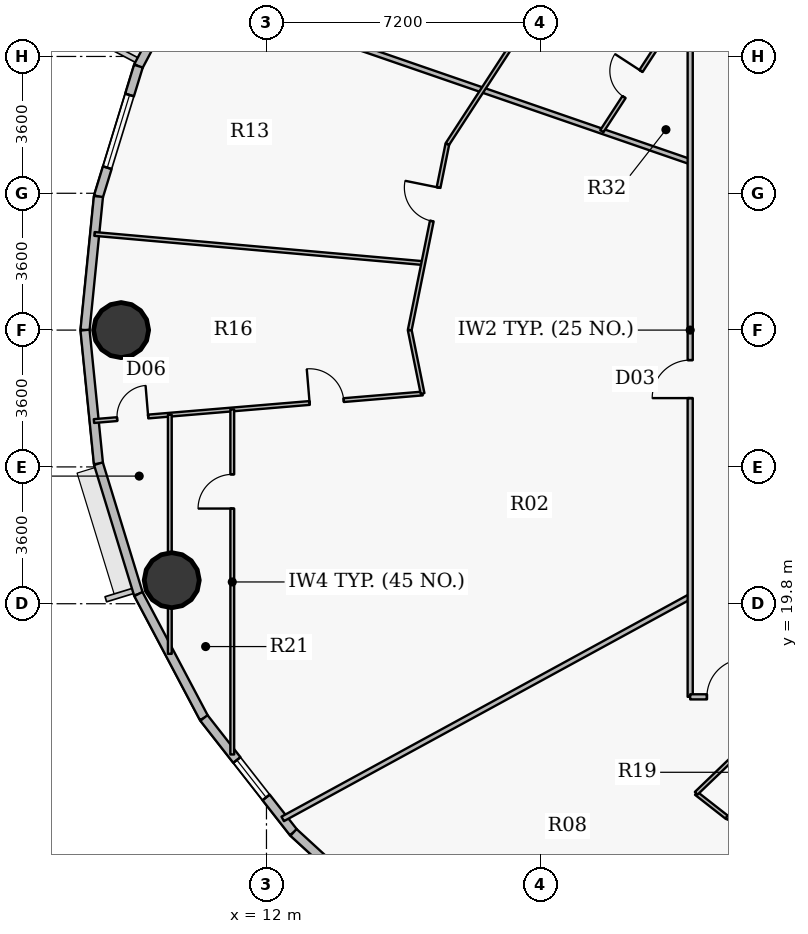
"""IFC4 building model, lengths in metres.
Left out: names, types, materials, properties, quantities, classifications, styles, units other than length and angle.
Written with IfcOpenShell. Run it as: python <this file> out.ifc"""

import sys

from ifc_helpers import new_model, si_unit, direction, frame, frame_2d, origin, origin_2d, place, context, subcontext, project, spatial, rectangle, hollow_circle, extrude, source, transform, mapped, element, fill, save


model = new_model("IFC4")
c1 = context("Model", 3, precision=1e-05, world=origin(), true_north=direction((0.0, 1.0)))
c2 = subcontext(c1, "Body", "Model", "MODEL_VIEW")
j1 = project(units=[si_unit("LENGTHUNIT", "METRE"), si_unit("PLANEANGLEUNIT", "RADIAN")], contexts=[c1])
p1 = place(None, origin())
s1 = spatial("IfcSite", under=j1, at=p1, CompositionType="ELEMENT")
p2 = place(p1, origin())
s2 = spatial("IfcBuilding", under=s1, at=p2, CompositionType="ELEMENT")
p3 = place(p2, frame((0.0, 0.0, 100.95)))
s3 = spatial("IfcBuildingStorey", under=s2, at=p3, CompositionType="ELEMENT", Elevation=100.95)
for number, where, z_axis, x_axis in (
    (1, (8.175, 27.0, 0.0), (0.0, 0.0, 1.0), (1.0, 0.0, 0.0)),
    (2, (9.507, 20.419, 0.0), (0.0, 0.0, 1.0), (1.0, 0.0, 0.0)),
):
    element("IfcColumn", number, at=place(p3, frame(where, z_axis=z_axis, x_axis=x_axis)), inside=s3, PredefinedType="COLUMN", context=c2, shape_type="SweptSolid", body=[
        extrude(hollow_circle(Radius=0.725, WallThickness=0.042, at=origin_2d()), origin(), (0.0, 0.0, 1.0), 3.75),
    ])
p4 = place(p3, frame((8.63, 33.945, 0.0), z_axis=(0.0, 0.0, 1.0), x_axis=(0.467614004126, 0.883932770716, 0.0)))
e3 = element("IfcWall", 3, at=p4, inside=s3, PredefinedType="SOLIDWALL", context=c2, shape_type="SweptSolid", body=[
    extrude(rectangle(XDim=3.689, YDim=0.24, at=frame_2d((1.844, 0.0))), origin(), (0.0, 0.0, 1.0), 3.5),
])
p5 = place(p4, frame((0.774, 0.0, 0.9)))
e4 = element("IfcOpeningElement", 4, at=p5, cuts=e3, PredefinedType="OPENING", context=c2, shape_type="SweptSolid", body=[
    extrude(rectangle(XDim=1.25, YDim=1.65, at=origin_2d()), frame((0.625, 0.13, 0.825), z_axis=(0.0, -1.0, 0.0), x_axis=(1.0, 0.0, 0.0)), (0.0, 0.0, 1.0), 0.26),
])
p6 = place(p3, frame((7.578, 30.515, 0.0), z_axis=(0.0, 0.0, 1.0), x_axis=(0.293124431344, 0.956074300329, 0.0)))
e5 = element("IfcWall", 5, at=p6, inside=s3, PredefinedType="SOLIDWALL", context=c2, shape_type="SweptSolid", body=[
    extrude(rectangle(XDim=3.587, YDim=0.24, at=frame_2d((1.793, 0.0))), origin(), (0.0, 0.0, 1.0), 3.5),
])
p7 = place(p6, frame((0.794, 0.0, 0.9)))
e6 = element("IfcOpeningElement", 6, at=p7, cuts=e5, PredefinedType="OPENING", context=c2, shape_type="SweptSolid", body=[
    extrude(rectangle(XDim=2.0, YDim=1.75, at=origin_2d()), frame((1.0, 0.13, 0.875), z_axis=(0.0, -1.0, 0.0), x_axis=(1.0, 0.0, 0.0)), (0.0, 0.0, 1.0), 0.26),
])
for number, where, z_axis, x_axis in (
    (7, (7.225, 27.0, 0.0), (0.0, 0.0, 1.0), (0.1, 0.995, 0.0)),
    (8, (7.578, 23.485, 0.0), (0.0, 0.0, 1.0), (-0.1, 0.995, 0.0)),
):
    element("IfcWall", number, at=place(p3, frame(where, z_axis=z_axis, x_axis=x_axis)), inside=s3, PredefinedType="SOLIDWALL", context=c2, shape_type="SweptSolid", body=[
        extrude(rectangle(XDim=3.533, YDim=0.24, at=frame_2d((1.767, 0.0))), origin(), (0.0, 0.0, 1.0), 3.5),
    ])
p8 = place(p3, frame((8.63, 20.055, 0.0), z_axis=(0.0, 0.0, 1.0), x_axis=(-0.293124431344, 0.956074300329, 0.0)))
e9 = element("IfcWall", 9, at=p8, inside=s3, PredefinedType="SOLIDWALL", context=c2, shape_type="SweptSolid", body=[
    extrude(rectangle(XDim=3.587, YDim=0.24, at=frame_2d((1.793, 0.0))), origin(), (0.0, 0.0, 1.0), 3.5),
])
p9 = place(p3, frame((10.355, 16.794, 0.0), z_axis=(0.0, 0.0, 1.0), x_axis=(-0.467614004126, 0.883932770716, 0.0)))
e10 = element("IfcWall", 10, at=p9, inside=s3, PredefinedType="SOLIDWALL", context=c2, shape_type="SweptSolid", body=[
    extrude(rectangle(XDim=3.689, YDim=0.24, at=frame_2d((1.844, 0.0))), origin(), (0.0, 0.0, 1.0), 3.5),
])
p10 = place(p3, frame((12.711, 13.783, 0.0), z_axis=(0.0, 0.0, 1.0), x_axis=(-0.616272103517, 0.787533297345, 0.0)))
e11 = element("IfcWall", 11, at=p10, inside=s3, PredefinedType="SOLIDWALL", context=c2, shape_type="SweptSolid", body=[
    extrude(rectangle(XDim=3.823, YDim=0.24, at=frame_2d((1.912, 0.0))), origin(), (0.0, 0.0, 1.0), 3.5),
])
p11 = place(p10, frame((1.168, 0.0, 0.9)))
e12 = element("IfcOpeningElement", 12, at=p11, cuts=e11, PredefinedType="OPENING", context=c2, shape_type="SweptSolid", body=[
    extrude(rectangle(XDim=1.25, YDim=1.65, at=origin_2d()), frame((0.625, 0.13, 0.825), z_axis=(0.0, -1.0, 0.0), x_axis=(1.0, 0.0, 0.0)), (0.0, 0.0, 1.0), 0.26),
])
p12 = place(p3, frame((15.642, 11.097, 0.0), z_axis=(0.0, 0.0, 1.0), x_axis=(-0.737113356241, 0.675769117414, 0.0)))
e13 = element("IfcWall", 13, at=p12, inside=s3, PredefinedType="SOLIDWALL", context=c2, shape_type="SweptSolid", body=[
    extrude(rectangle(XDim=3.976, YDim=0.24, at=frame_2d((1.988, 0.0))), origin(), (0.0, 0.0, 1.0), 3.5),
])
p13 = place(p3, frame((7.461, 24.606, 0.0), z_axis=(0.0, 0.0, 1.0), x_axis=(0.996502351316, 0.083564728334, 0.0)))
e14 = element("IfcWall", 14, at=p13, inside=s3, PredefinedType="PARTITIONING", context=c2, shape_type="SweptSolid", body=[
    extrude(rectangle(XDim=8.677, YDim=0.1, at=frame_2d((4.338, 0.0))), origin(), (0.0, 0.0, 1.0), 2.935),
])
p14 = place(p13, frame((5.695, 0.0, 0.0)))
e15 = element("IfcOpeningElement", 15, at=p14, cuts=e14, PredefinedType="OPENING", context=c2, shape_type="SweptSolid", body=[
    extrude(rectangle(XDim=0.9, YDim=2.1, at=origin_2d()), frame((0.45, 0.06, 1.05), z_axis=(0.0, -1.0, 0.0), x_axis=(1.0, 0.0, 0.0)), (0.0, 0.0, 1.0), 0.12),
])
p15 = place(p13, frame((0.612, 0.0, 0.0)))
e16 = element("IfcOpeningElement", 16, at=p15, cuts=e14, PredefinedType="OPENING", context=c2, shape_type="SweptSolid", body=[
    extrude(rectangle(XDim=0.82, YDim=2.1, at=origin_2d()), frame((0.41, 0.06, 1.05), z_axis=(0.0, -1.0, 0.0), x_axis=(1.0, 0.0, 0.0)), (0.0, 0.0, 1.0), 0.12),
])
p16 = place(p3, frame((7.474, 29.53, 0.0), z_axis=(0.0, 0.0, 1.0), x_axis=(0.99609030315, -0.088340862406, 0.0)))
e17 = element("IfcWall", 17, at=p16, inside=s3, PredefinedType="PARTITIONING", context=c2, shape_type="SweptSolid", body=[
    extrude(rectangle(XDim=8.686, YDim=0.1, at=frame_2d((4.343, 0.0))), origin(), (0.0, 0.0, 1.0), 2.935),
])
p17 = place(p3, frame((9.457, 18.481, 0.0), z_axis=(0.0, 0.0, 1.0), x_axis=(0.0, 1.0, 0.0)))
e18 = element("IfcWall", 18, at=p17, inside=s3, PredefinedType="PARTITIONING", context=c2, shape_type="SweptSolid", body=[
    extrude(rectangle(XDim=6.293, YDim=0.1, at=frame_2d((3.146, 0.0))), origin(), (0.0, 0.0, 1.0), 2.935),
])
p18 = place(p3, frame((9.741, 36.057, 0.0), z_axis=(0.0, 0.0, 1.0), x_axis=(0.945349748634, -0.326058051207, 0.0)))
e19 = element("IfcWall", 19, at=p18, inside=s3, PredefinedType="PARTITIONING", context=c2, shape_type="SweptSolid", body=[
    extrude(rectangle(XDim=14.184, YDim=0.135, at=frame_2d((7.092, 0.0))), origin(), (0.0, 0.0, 1.0), 2.935),
])
p19 = place(p3, frame((11.1, 15.834, 0.0), z_axis=(0.0, 0.0, 1.0), x_axis=(0.0, 1.0, 0.0)))
e20 = element("IfcWall", 20, at=p19, inside=s3, PredefinedType="PARTITIONING", context=c2, shape_type="SweptSolid", body=[
    extrude(rectangle(XDim=9.078, YDim=0.1, at=frame_2d((4.539, 0.0))), origin(), (0.0, 0.0, 1.0), 2.935),
])
p20 = place(p19, frame((6.47, 0.0, 0.0)))
e21 = element("IfcOpeningElement", 21, at=p20, cuts=e20, PredefinedType="OPENING", context=c2, shape_type="SweptSolid", body=[
    extrude(rectangle(XDim=0.9, YDim=2.1, at=origin_2d()), frame((0.45, 0.06, 1.05), z_axis=(0.0, -1.0, 0.0), x_axis=(1.0, 0.0, 0.0)), (0.0, 0.0, 1.0), 0.12),
])
p21 = place(p3, frame((12.427, 14.138, 0.0), z_axis=(0.0, 0.0, 1.0), x_axis=(0.877835987922, 0.47896135367, 0.0)))
e22 = element("IfcWall", 22, at=p21, inside=s3, PredefinedType="PARTITIONING", context=c2, shape_type="SweptSolid", body=[
    extrude(rectangle(XDim=12.215, YDim=0.135, at=frame_2d((6.107, 0.0))), origin(), (0.0, 0.0, 1.0), 2.935),
])
p22 = place(p3, frame((15.77, 27.0, 0.0), z_axis=(0.0, 0.0, 1.0), x_axis=(0.198211883057, -0.980159195955, 0.0)))
e23 = element("IfcWall", 23, at=p22, inside=s3, PredefinedType="PARTITIONING", context=c2, shape_type="SweptSolid", body=[
    extrude(rectangle(XDim=1.702, YDim=0.1, at=frame_2d((0.851, 0.0))), origin(), (0.0, 0.0, 1.0), 2.935),
])
p23 = place(p3, frame((15.77, 27.0, 0.0), z_axis=(0.0, 0.0, 1.0), x_axis=(0.198230919145, 0.980155346205, 0.0)))
e24 = element("IfcWall", 24, at=p23, inside=s3, PredefinedType="PARTITIONING", context=c2, shape_type="SweptSolid", body=[
    extrude(rectangle(XDim=4.994, YDim=0.1, at=frame_2d((2.497, 0.0))), origin(), (0.0, 0.0, 1.0), 2.935),
])
p24 = place(p23, frame((2.926, 0.0, 0.0)))
e25 = element("IfcOpeningElement", 25, at=p24, cuts=e24, PredefinedType="OPENING", context=c2, shape_type="SweptSolid", body=[
    extrude(rectangle(XDim=0.9, YDim=2.1, at=origin_2d()), frame((0.45, 0.06, 1.05), z_axis=(0.0, -1.0, 0.0), x_axis=(1.0, 0.0, 0.0)), (0.0, 0.0, 1.0), 0.12),
])
p25 = place(p3, frame((16.76, 31.895, 0.0), z_axis=(0.0, 0.0, 1.0), x_axis=(0.545405249109, 0.838172484781, 0.0)))
e26 = element("IfcWall", 26, at=p25, inside=s3, PredefinedType="PARTITIONING", context=c2, shape_type="SweptSolid", body=[
    extrude(rectangle(XDim=5.269, YDim=0.1, at=frame_2d((2.634, 0.0))), origin(), (0.0, 0.0, 1.0), 2.935),
])
p26 = place(p25, frame((3.012, 0.0, 0.0)))
e27 = element("IfcOpeningElement", 27, at=p26, cuts=e26, PredefinedType="OPENING", context=c2, shape_type="SweptSolid", body=[
    extrude(rectangle(XDim=0.9, YDim=2.1, at=origin_2d()), frame((0.45, 0.06, 1.05), z_axis=(0.0, -1.0, 0.0), x_axis=(1.0, 0.0, 0.0)), (0.0, 0.0, 1.0), 0.12),
])
p27 = place(p3, frame((20.825, 32.234, 0.0), z_axis=(0.0, 0.0, 1.0), x_axis=(0.545376787896, 0.838191004023, 0.0)))
e28 = element("IfcWall", 28, at=p27, inside=s3, PredefinedType="PARTITIONING", context=c2, shape_type="SweptSolid", body=[
    extrude(rectangle(XDim=2.96, YDim=0.1, at=frame_2d((1.48, 0.0))), origin(), (0.0, 0.0, 1.0), 2.935),
])
p28 = place(p27, frame((1.07, 0.0, 0.0)))
e29 = element("IfcOpeningElement", 29, at=p28, cuts=e28, PredefinedType="OPENING", context=c2, shape_type="SweptSolid", body=[
    extrude(rectangle(XDim=0.82, YDim=2.1, at=origin_2d()), frame((0.41, 0.06, 1.05), z_axis=(0.0, -1.0, 0.0), x_axis=(1.0, 0.0, 0.0)), (0.0, 0.0, 1.0), 0.12),
])
p29 = place(p3, frame((23.15, 17.35, 0.0), z_axis=(0.0, 0.0, 1.0), x_axis=(0.0, 1.0, 0.0)))
e30 = element("IfcWall", 30, at=p29, inside=s3, PredefinedType="PARTITIONING", context=c2, shape_type="SweptSolid", body=[
    extrude(rectangle(XDim=19.3, YDim=0.135, at=frame_2d((9.65, 0.0))), origin(), (0.0, 0.0, 1.0), 2.935),
])
p30 = place(p29, frame((7.86, 0.0, 0.0)))
e31 = element("IfcOpeningElement", 31, at=p30, cuts=e30, PredefinedType="OPENING", context=c2, shape_type="SweptSolid", body=[
    extrude(rectangle(XDim=1.0, YDim=2.15, at=origin_2d()), frame((0.5, 0.078, 1.075), z_axis=(0.0, -1.0, 0.0), x_axis=(1.0, 0.0, 0.0)), (0.0, 0.0, 1.0), 0.155),
])
p31 = place(p3, frame((23.15, 17.35, 0.0), z_axis=(0.0, 0.0, 1.0), x_axis=(1.0, 0.0, 0.0)))
e32 = element("IfcWall", 32, at=p31, inside=s3, PredefinedType="PARTITIONING", context=c2, shape_type="SweptSolid", body=[
    extrude(rectangle(XDim=10.373, YDim=0.135, at=frame_2d((5.187, 0.0))), origin(), (0.0, 0.0, 1.0), 2.935),
])
p32 = place(p31, frame((0.44, 0.0, 0.0)))
e33 = element("IfcOpeningElement", 33, at=p32, cuts=e32, PredefinedType="OPENING", context=c2, shape_type="SweptSolid", body=[
    extrude(rectangle(XDim=1.0, YDim=2.15, at=origin_2d()), frame((0.5, 0.078, 1.075), z_axis=(0.0, -1.0, 0.0), x_axis=(1.0, 0.0, 0.0)), (0.0, 0.0, 1.0), 0.155),
])
p33 = place(p3, frame((23.307, 14.812, 0.0), z_axis=(0.0, 0.0, 1.0), x_axis=(0.787398737985, -0.616444018075, 0.0)))
e34 = element("IfcWall", 34, at=p33, inside=s3, PredefinedType="PARTITIONING", context=c2, shape_type="SweptSolid", body=[
    extrude(rectangle(XDim=1.018, YDim=0.1, at=frame_2d((0.509, 0.0))), origin(), (0.0, 0.0, 1.0), 3.035),
])
p34 = place(p3, frame((23.307, 14.812, 0.0), z_axis=(0.0, 0.0, 1.0), x_axis=(0.721286127108, 0.692637223113, 0.0)))
e35 = element("IfcWall", 35, at=p34, inside=s3, PredefinedType="PARTITIONING", context=c2, shape_type="SweptSolid", body=[
    extrude(rectangle(XDim=3.664, YDim=0.1, at=frame_2d((1.832, 0.0))), origin(), (0.0, 0.0, 1.0), 3.5),
])
p35 = place(p3, frame((23.808, 6.661, 0.0), z_axis=(0.0, 0.0, 1.0), x_axis=(0.51416439954, 0.857691652195, 0.0)))
e36 = element("IfcWall", 36, at=p35, inside=s3, PredefinedType="PARTITIONING", context=c2, shape_type="SweptSolid", body=[
    extrude(rectangle(XDim=12.462, YDim=0.135, at=frame_2d((6.231, 0.0))), origin(), (0.0, 0.0, 1.0), 2.935),
])
p36 = place(p3, frame((24.109, 14.184, 0.0), z_axis=(0.0, 0.0, 1.0), x_axis=(0.9288090756, -0.370558633798, 0.0)))
e37 = element("IfcWall", 37, at=p36, inside=s3, PredefinedType="PARTITIONING", context=c2, shape_type="SweptSolid", body=[
    extrude(rectangle(XDim=6.072, YDim=0.1, at=frame_2d((3.036, 0.0))), origin(), (0.0, 0.0, 1.0), 2.935),
])
p37 = place(p36, frame((1.398, 0.0, 0.0)))
e38 = element("IfcOpeningElement", 38, at=p37, cuts=e37, PredefinedType="OPENING", context=c2, shape_type="SweptSolid", body=[
    extrude(rectangle(XDim=0.9, YDim=2.1, at=origin_2d()), frame((0.45, 0.06, 1.05), z_axis=(0.0, -1.0, 0.0), x_axis=(1.0, 0.0, 0.0)), (0.0, 0.0, 1.0), 0.12),
])
m1 = source(origin(), c2, "Body", "SweptSolid", [
    extrude(rectangle(XDim=2.0, YDim=1.75, at=origin_2d()), frame((1.0, 0.03, 0.875), z_axis=(0.0, -1.0, 0.0), x_axis=(1.0, 0.0, 0.0)), (0.0, 0.0, 1.0), 0.06),
])
p38 = place(p7, origin())
e39 = element("IfcWindow", 39, at=p38, inside=s3, PartitioningType="DOUBLE_PANEL_VERTICAL", PredefinedType="WINDOW", context=c2, shape_type="MappedRepresentation", body=[
    mapped(m1, transform((0.0, 0.0, 0.0), x_axis=(1.0, 0.0, 0.0), y_axis=(0.0, 1.0, 0.0), z_axis=(0.0, 0.0, 1.0), scale=1.0)),
])
fill(e6, e39)
m2 = source(origin(), c2, "Body", "SweptSolid", [
    extrude(rectangle(XDim=1.25, YDim=1.65, at=origin_2d()), frame((0.625, 0.03, 0.825), z_axis=(0.0, -1.0, 0.0), x_axis=(1.0, 0.0, 0.0)), (0.0, 0.0, 1.0), 0.06),
])
p39 = place(p11, origin())
e40 = element("IfcWindow", 40, at=p39, inside=s3, PartitioningType="SINGLE_PANEL", PredefinedType="WINDOW", context=c2, shape_type="MappedRepresentation", body=[
    mapped(m2, transform((0.0, 0.0, 0.0), x_axis=(1.0, 0.0, 0.0), y_axis=(0.0, 1.0, 0.0), z_axis=(0.0, 0.0, 1.0), scale=1.0)),
])
fill(e12, e40)
m3 = source(origin(), c2, "Body", "SweptSolid", [
    extrude(rectangle(XDim=0.82, YDim=2.1, at=origin_2d()), frame((0.41, 0.025, 1.05), z_axis=(0.0, -1.0, 0.0), x_axis=(1.0, 0.0, 0.0)), (0.0, 0.0, 1.0), 0.05),
])
p40 = place(p28, origin())
e41 = element("IfcDoor", 41, at=p40, inside=s3, OperationType="SINGLE_SWING_RIGHT", PredefinedType="DOOR", context=c2, shape_type="MappedRepresentation", body=[
    mapped(m3, transform((0.0, 0.0, 0.0), x_axis=(1.0, 0.0, 0.0), y_axis=(0.0, 1.0, 0.0), z_axis=(0.0, 0.0, 1.0), scale=1.0)),
])
fill(e29, e41)
m4 = source(origin(), c2, "Body", "SweptSolid", [
    extrude(rectangle(XDim=1.0, YDim=2.15, at=origin_2d()), frame((0.5, 0.025, 1.075), z_axis=(0.0, -1.0, 0.0), x_axis=(1.0, 0.0, 0.0)), (0.0, 0.0, 1.0), 0.05),
])
p41 = place(p30, origin())
e42 = element("IfcDoor", 42, at=p41, inside=s3, OperationType="SINGLE_SWING_LEFT", PredefinedType="DOOR", context=c2, shape_type="MappedRepresentation", body=[
    mapped(m4, transform((0.0, 0.0, 0.0), x_axis=(1.0, 0.0, 0.0), y_axis=(0.0, 1.0, 0.0), z_axis=(0.0, 0.0, 1.0), scale=1.0)),
])
fill(e31, e42)
m5 = source(origin(), c2, "Body", "SweptSolid", [
    extrude(rectangle(XDim=0.9, YDim=2.1, at=origin_2d()), frame((0.45, 0.025, 1.05), z_axis=(0.0, -1.0, 0.0), x_axis=(1.0, 0.0, 0.0)), (0.0, 0.0, 1.0), 0.05),
])
p42 = place(p24, origin())
e43 = element("IfcDoor", 43, at=p42, inside=s3, OperationType="SINGLE_SWING_RIGHT", PredefinedType="DOOR", context=c2, shape_type="MappedRepresentation", body=[
    mapped(m5, transform((0.0, 0.0, 0.0), x_axis=(1.0, 0.0, 0.0), y_axis=(0.0, 1.0, 0.0), z_axis=(0.0, 0.0, 1.0), scale=1.0)),
])
fill(e25, e43)
p43 = place(p14, origin())
e44 = element("IfcDoor", 44, at=p43, inside=s3, OperationType="SINGLE_SWING_LEFT", PredefinedType="DOOR", context=c2, shape_type="MappedRepresentation", body=[
    mapped(m5, transform((0.0, 0.0, 0.0), x_axis=(1.0, 0.0, 0.0), y_axis=(0.0, 1.0, 0.0), z_axis=(0.0, 0.0, 1.0), scale=1.0)),
])
fill(e15, e44)
p44 = place(p15, origin())
e45 = element("IfcDoor", 45, at=p44, inside=s3, OperationType="SINGLE_SWING_RIGHT", PredefinedType="DOOR", context=c2, shape_type="MappedRepresentation", body=[
    mapped(m3, transform((0.0, 0.0, 0.0), x_axis=(1.0, 0.0, 0.0), y_axis=(0.0, 1.0, 0.0), z_axis=(0.0, 0.0, 1.0), scale=1.0)),
])
fill(e16, e45)
p45 = place(p20, origin())
e46 = element("IfcDoor", 46, at=p45, inside=s3, OperationType="SINGLE_SWING_LEFT", PredefinedType="DOOR", context=c2, shape_type="MappedRepresentation", body=[
    mapped(m5, transform((0.0, 0.0, 0.0), x_axis=(1.0, 0.0, 0.0), y_axis=(0.0, 1.0, 0.0), z_axis=(0.0, 0.0, 1.0), scale=1.0)),
])
fill(e21, e46)
p46 = place(p32, origin())
e47 = element("IfcDoor", 47, at=p46, inside=s3, OperationType="SINGLE_SWING_RIGHT", PredefinedType="DOOR", context=c2, shape_type="MappedRepresentation", body=[
    mapped(m4, transform((0.0, 0.0, 0.0), x_axis=(1.0, 0.0, 0.0), y_axis=(0.0, 1.0, 0.0), z_axis=(0.0, 0.0, 1.0), scale=1.0)),
])
fill(e33, e47)
save(model, sys.argv[1])
